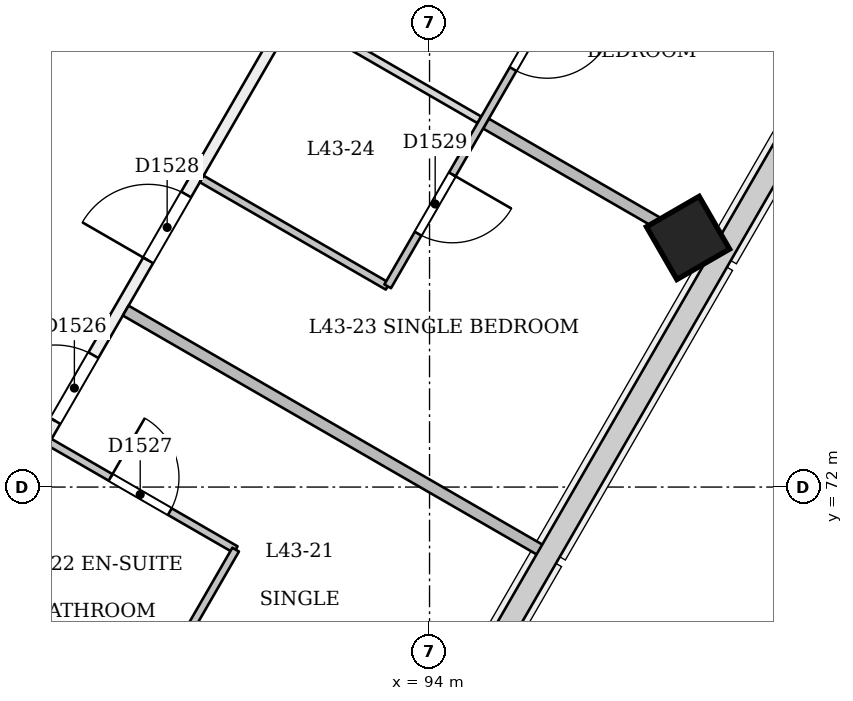
"""IFC4 building model, lengths in metres.
Left out: names, types, materials, properties, quantities, classifications, styles, units other than length and angle.
Written with IfcOpenShell. Run it as: python <this file> out.ifc"""

import sys

from ifc_helpers import new_model, si_unit, direction, frame, frame_2d, origin, origin_2d, place, context, subcontext, project, spatial, rectangle, extrude, element, fill, save


model = new_model("IFC4")
c1 = context("Model", 3, precision=1e-05, world=origin(), true_north=direction((0.0, 1.0)))
c2 = subcontext(c1, "Body", "Model", "MODEL_VIEW")
j1 = project(units=[si_unit("LENGTHUNIT", "METRE"), si_unit("PLANEANGLEUNIT", "RADIAN")], contexts=[c1])
p1 = place(None, origin())
s1 = spatial("IfcSite", under=j1, at=p1, CompositionType="ELEMENT")
p2 = place(p1, origin())
s2 = spatial("IfcBuilding", under=s1, at=p2, CompositionType="ELEMENT")
p3 = place(p2, frame((0.0, 0.0, 167.4)))
s3 = spatial("IfcBuildingStorey", under=s2, at=p3, CompositionType="ELEMENT", Elevation=167.4)
p4 = place(p3, frame((97.428, 75.23, -0.024), z_axis=(-0.02222134892, 0.038480872521, 0.999012229206), x_axis=(-0.500174592943, -0.865639497158, 0.022217955235)))
e1 = element("IfcColumn", 1, at=p4, inside=s3, PredefinedType="COLUMN", context=c2, shape_type="SweptSolid", body=[
    extrude(rectangle(XDim=0.8, YDim=0.8, at=origin_2d()), origin(), (0.0, 0.0, 1.0), 3.604),
])
p5 = place(p3, frame((95.735, 90.2, 0.0), z_axis=(0.0, 0.0, 1.0), x_axis=(-0.499997763281, -0.866026695151, 0.0)))
e2 = element("IfcWall", 2, at=p5, inside=s3, PredefinedType="PARTITIONING", context=c2, shape_type="SweptSolid", body=[
    extrude(rectangle(XDim=21.34, YDim=0.15, at=frame_2d((10.67, 0.0))), origin(), (0.0, 0.0, 1.0), 3.15),
])
p6 = place(p5, frame((14.599, 0.0, 0.0)))
e3 = element("IfcOpeningElement", 3, at=p6, cuts=e2, PredefinedType="OPENING", context=c2, shape_type="SweptSolid", body=[
    extrude(rectangle(XDim=0.9, YDim=2.1, at=frame_2d((0.45, 1.05))), frame((0.0, 0.085, 0.0), z_axis=(0.0, -1.0, 0.0), x_axis=(1.0, 0.0, 0.0)), (0.0, 0.0, 1.0), 0.171),
])
p7 = place(p5, frame((6.441, 0.0, 0.0)))
e4 = element("IfcOpeningElement", 4, at=p7, cuts=e2, PredefinedType="OPENING", context=c2, shape_type="SweptSolid", body=[
    extrude(rectangle(XDim=1.0, YDim=2.1, at=frame_2d((0.5, 1.05))), frame((0.0, 0.085, 0.0), z_axis=(0.0, -1.0, 0.0), x_axis=(1.0, 0.0, 0.0)), (0.0, 0.0, 1.0), 0.171),
])
p8 = place(p5, frame((10.93, 0.0, 0.0)))
e5 = element("IfcOpeningElement", 5, at=p8, cuts=e2, PredefinedType="OPENING", context=c2, shape_type="SweptSolid", body=[
    extrude(rectangle(XDim=1.0, YDim=2.1, at=frame_2d((0.5, 1.05))), frame((0.0, 0.085, 0.0), z_axis=(0.0, -1.0, 0.0), x_axis=(1.0, 0.0, 0.0)), (0.0, 0.0, 1.0), 0.171),
])
p9 = place(p5, frame((2.426, 0.0, 0.0)))
e6 = element("IfcOpeningElement", 6, at=p9, cuts=e2, PredefinedType="OPENING", context=c2, shape_type="SweptSolid", body=[
    extrude(rectangle(XDim=1.0, YDim=2.1, at=frame_2d((0.5, 1.05))), frame((0.0, 0.085, 0.0), z_axis=(0.0, -1.0, 0.0), x_axis=(1.0, 0.0, 0.0)), (0.0, 0.0, 1.0), 0.171),
])
p10 = place(p3, frame((85.065, 65.919, 0.0), z_axis=(0.0, 0.0, 1.0), x_axis=(0.50000123084, 0.866024693157, 0.0)))
e7 = element("IfcWall", 7, at=p10, inside=s3, PredefinedType="PARTITIONING", context=c2, shape_type="SweptSolid", body=[
    extrude(rectangle(XDim=27.746, YDim=0.15, at=frame_2d((13.873, 0.0))), origin(), (0.0, 0.0, 1.0), 2.75),
])
p11 = place(p10, frame((2.496, 0.0, 0.0)))
e8 = element("IfcOpeningElement", 8, at=p11, cuts=e7, PredefinedType="OPENING", context=c2, shape_type="SweptSolid", body=[
    extrude(rectangle(XDim=1.0, YDim=2.1, at=frame_2d((0.5, 1.05))), frame((0.0, 0.085, 0.0), z_axis=(0.0, -1.0, 0.0), x_axis=(1.0, 0.0, 0.0)), (0.0, 0.0, 1.0), 0.171),
])
p12 = place(p10, frame((8.025, 0.0, 0.0)))
e9 = element("IfcOpeningElement", 9, at=p12, cuts=e7, PredefinedType="OPENING", context=c2, shape_type="SweptSolid", body=[
    extrude(rectangle(XDim=1.0, YDim=2.1, at=frame_2d((0.5, 1.05))), frame((0.0, 0.085, 0.0), z_axis=(0.0, -1.0, 0.0), x_axis=(1.0, 0.0, 0.0)), (0.0, 0.0, 1.0), 0.171),
])
p13 = place(p10, frame((10.466, 0.0, 0.0)))
e10 = element("IfcOpeningElement", 10, at=p13, cuts=e7, PredefinedType="OPENING", context=c2, shape_type="SweptSolid", body=[
    extrude(rectangle(XDim=1.0, YDim=2.1, at=frame_2d((0.5, 1.05))), frame((0.0, 0.085, 0.0), z_axis=(0.0, -1.0, 0.0), x_axis=(1.0, 0.0, 0.0)), (0.0, 0.0, 1.0), 0.171),
])
p14 = place(p10, frame((17.025, 0.0, 0.0)))
e11 = element("IfcOpeningElement", 11, at=p14, cuts=e7, PredefinedType="OPENING", context=c2, shape_type="SweptSolid", body=[
    extrude(rectangle(XDim=1.0, YDim=2.1, at=frame_2d((0.5, 1.05))), frame((0.0, 0.085, 0.0), z_axis=(0.0, -1.0, 0.0), x_axis=(1.0, 0.0, 0.0)), (0.0, 0.0, 1.0), 0.171),
])
p15 = place(p10, frame((19.35, 0.0, 0.0)))
e12 = element("IfcOpeningElement", 12, at=p15, cuts=e7, PredefinedType="OPENING", context=c2, shape_type="SweptSolid", body=[
    extrude(rectangle(XDim=1.0, YDim=2.1, at=frame_2d((0.5, 1.05))), frame((0.0, 0.085, 0.0), z_axis=(0.0, -1.0, 0.0), x_axis=(1.0, 0.0, 0.0)), (0.0, 0.0, 1.0), 0.171),
])
p16 = place(p10, frame((26.075, 0.0, 0.0)))
e13 = element("IfcOpeningElement", 13, at=p16, cuts=e7, PredefinedType="OPENING", context=c2, shape_type="SweptSolid", body=[
    extrude(rectangle(XDim=1.1, YDim=2.1, at=frame_2d((0.55, 1.05))), frame((0.0, 0.085, 0.0), z_axis=(0.0, -1.0, 0.0), x_axis=(1.0, 0.0, 0.0)), (0.0, 0.0, 1.0), 0.171),
])
p17 = place(p3, frame((90.199, 69.012, 0.0), z_axis=(0.0, 0.0, 1.0), x_axis=(-0.866011447264, 0.500024172624, 0.0)))
e14 = element("IfcWall", 14, at=p17, inside=s3, PredefinedType="PARTITIONING", context=c2, shape_type="SweptSolid", body=[
    extrude(rectangle(XDim=2.825, YDim=0.1, at=frame_2d((1.413, 0.0))), origin(), (0.0, 0.0, 1.0), 2.75),
])
p18 = place(p3, frame((89.003, 72.59, 0.0), z_axis=(0.0, 0.0, 1.0), x_axis=(0.866011447264, -0.500024172624, 0.0)))
e15 = element("IfcWall", 15, at=p18, inside=s3, PredefinedType="PARTITIONING", context=c2, shape_type="SweptSolid", body=[
    extrude(rectangle(XDim=2.825, YDim=0.1, at=frame_2d((1.413, 0.0))), origin(), (0.0, 0.0, 1.0), 3.15),
])
p19 = place(p18, frame((0.925, 0.0, 0.0)))
e16 = element("IfcOpeningElement", 16, at=p19, cuts=e15, PredefinedType="OPENING", context=c2, shape_type="SweptSolid", body=[
    extrude(rectangle(XDim=0.9, YDim=2.1, at=frame_2d((0.45, 1.05))), frame((0.0, 0.061, 0.0), z_axis=(0.0, -1.0, 0.0), x_axis=(1.0, 0.0, 0.0)), (0.0, 0.0, 1.0), 0.121),
])
p20 = place(p3, frame((91.449, 71.177, 0.0), z_axis=(0.0, 0.0, 1.0), x_axis=(-0.500004234368, -0.866022959057, 0.0)))
e17 = element("IfcWall", 17, at=p20, inside=s3, PredefinedType="PARTITIONING", context=c2, shape_type="SweptSolid", body=[
    extrude(rectangle(XDim=2.5, YDim=0.1, at=frame_2d((1.25, 0.0))), origin(), (0.0, 0.0, 1.0), 2.75),
])
p21 = place(p3, frame((95.498, 71.149, 0.0), z_axis=(0.0, 0.0, 1.0), x_axis=(-0.866025401434, 0.500000004071, 0.0)))
e18 = element("IfcWall", 18, at=p21, inside=s3, PredefinedType="PARTITIONING", context=c2, shape_type="SweptSolid", body=[
    extrude(rectangle(XDim=6.345, YDim=0.15, at=frame_2d((3.173, 0.0))), origin(), (0.0, 0.0, 1.0), 2.65),
])
p22 = place(p3, frame((93.449, 74.641, 0.0), z_axis=(0.0, 0.0, 1.0), x_axis=(-0.866011447264, 0.500024172624, 0.0)))
e19 = element("IfcWall", 19, at=p22, inside=s3, PredefinedType="PARTITIONING", context=c2, shape_type="SweptSolid", body=[
    extrude(rectangle(XDim=2.825, YDim=0.1, at=frame_2d((1.413, 0.0))), origin(), (0.0, 0.0, 1.0), 3.15),
])
p23 = place(p3, frame((97.73, 75.056, 0.0), z_axis=(0.0, 0.0, 1.0), x_axis=(-0.866013532718, 0.500020560727, 0.0)))
e20 = element("IfcWall", 20, at=p23, inside=s3, PredefinedType="PARTITIONING", context=c2, shape_type="SweptSolid", body=[
    extrude(rectangle(XDim=3.45, YDim=0.15, at=frame_2d((1.725, 0.0))), origin(), (0.0, 0.0, 1.0), 2.65),
])
p24 = place(p3, frame((94.656, 76.831, 0.0), z_axis=(0.0, 0.0, 1.0), x_axis=(-0.866042014628, 0.499971228071, 0.0)))
e21 = element("IfcWall", 21, at=p24, inside=s3, PredefinedType="PARTITIONING", context=c2, shape_type="SweptSolid", body=[
    extrude(rectangle(XDim=2.775, YDim=0.1, at=frame_2d((1.388, 0.0))), origin(), (0.0, 0.0, 1.0), 2.75),
])
p25 = place(p3, frame((95.949, 78.971, 0.0), z_axis=(0.0, 0.0, 1.0), x_axis=(-0.500004234368, -0.866022959057, 0.0)))
e22 = element("IfcWall", 22, at=p25, inside=s3, PredefinedType="PARTITIONING", context=c2, shape_type="SweptSolid", body=[
    extrude(rectangle(XDim=5.0, YDim=0.1, at=frame_2d((2.5, 0.0))), origin(), (0.0, 0.0, 1.0), 2.75),
])
p26 = place(p25, frame((3.3, 0.0, 0.0)))
e23 = element("IfcOpeningElement", 23, at=p26, cuts=e22, PredefinedType="OPENING", context=c2, shape_type="SweptSolid", body=[
    extrude(rectangle(XDim=0.9, YDim=2.1, at=frame_2d((0.45, 1.05))), frame((0.0, 0.061, 0.0), z_axis=(0.0, -1.0, 0.0), x_axis=(1.0, 0.0, 0.0)), (0.0, 0.0, 1.0), 0.121),
])
p27 = place(p25, frame((0.8, 0.0, 0.0)))
e24 = element("IfcOpeningElement", 24, at=p27, cuts=e22, PredefinedType="OPENING", context=c2, shape_type="SweptSolid", body=[
    extrude(rectangle(XDim=0.9, YDim=2.1, at=frame_2d((0.45, 1.05))), frame((0.0, 0.061, 0.0), z_axis=(0.0, -1.0, 0.0), x_axis=(1.0, 0.0, 0.0)), (0.0, 0.0, 1.0), 0.121),
])
p28 = place(p12, origin())
e25 = element("IfcDoor", 25, at=p28, inside=s3, OperationType="SINGLE_SWING_LEFT", PredefinedType="NOTDEFINED", context=c2, shape_type="SweptSolid", body=[
    extrude(rectangle(XDim=1.0, YDim=2.1, at=frame_2d((0.5, 1.05))), frame((0.0, 0.025, 0.0), z_axis=(0.0, -1.0, 0.0), x_axis=(1.0, 0.0, 0.0)), (0.0, 0.0, 1.0), 0.05),
])
fill(e9, e25)
p29 = place(p19, origin())
e26 = element("IfcDoor", 26, at=p29, inside=s3, OperationType="SINGLE_SWING_LEFT", PredefinedType="NOTDEFINED", context=c2, shape_type="SweptSolid", body=[
    extrude(rectangle(XDim=0.9, YDim=2.1, at=frame_2d((0.45, 1.05))), frame((0.0, 0.025, 0.0), z_axis=(0.0, -1.0, 0.0), x_axis=(1.0, 0.0, 0.0)), (0.0, 0.0, 1.0), 0.05),
])
fill(e16, e26)
p30 = place(p13, origin())
e27 = element("IfcDoor", 27, at=p30, inside=s3, OperationType="SINGLE_SWING_LEFT", PredefinedType="NOTDEFINED", context=c2, shape_type="SweptSolid", body=[
    extrude(rectangle(XDim=1.0, YDim=2.1, at=frame_2d((0.5, 1.05))), frame((0.0, 0.025, 0.0), z_axis=(0.0, -1.0, 0.0), x_axis=(1.0, 0.0, 0.0)), (0.0, 0.0, 1.0), 0.05),
])
fill(e10, e27)
p31 = place(p26, origin())
e28 = element("IfcDoor", 28, at=p31, inside=s3, OperationType="SINGLE_SWING_LEFT", PredefinedType="NOTDEFINED", context=c2, shape_type="SweptSolid", body=[
    extrude(rectangle(XDim=0.9, YDim=2.1, at=frame_2d((0.45, 1.05))), frame((0.0, 0.025, 0.0), z_axis=(0.0, -1.0, 0.0), x_axis=(1.0, 0.0, 0.0)), (0.0, 0.0, 1.0), 0.05),
])
fill(e23, e28)
p32 = place(p27, origin())
e29 = element("IfcDoor", 29, at=p32, inside=s3, OperationType="SINGLE_SWING_LEFT", PredefinedType="NOTDEFINED", context=c2, shape_type="SweptSolid", body=[
    extrude(rectangle(XDim=0.9, YDim=2.1, at=frame_2d((0.45, 1.05))), frame((0.0, 0.025, 0.0), z_axis=(0.0, -1.0, 0.0), x_axis=(1.0, 0.0, 0.0)), (0.0, 0.0, 1.0), 0.05),
])
fill(e24, e29)
save(model, sys.argv[1])
